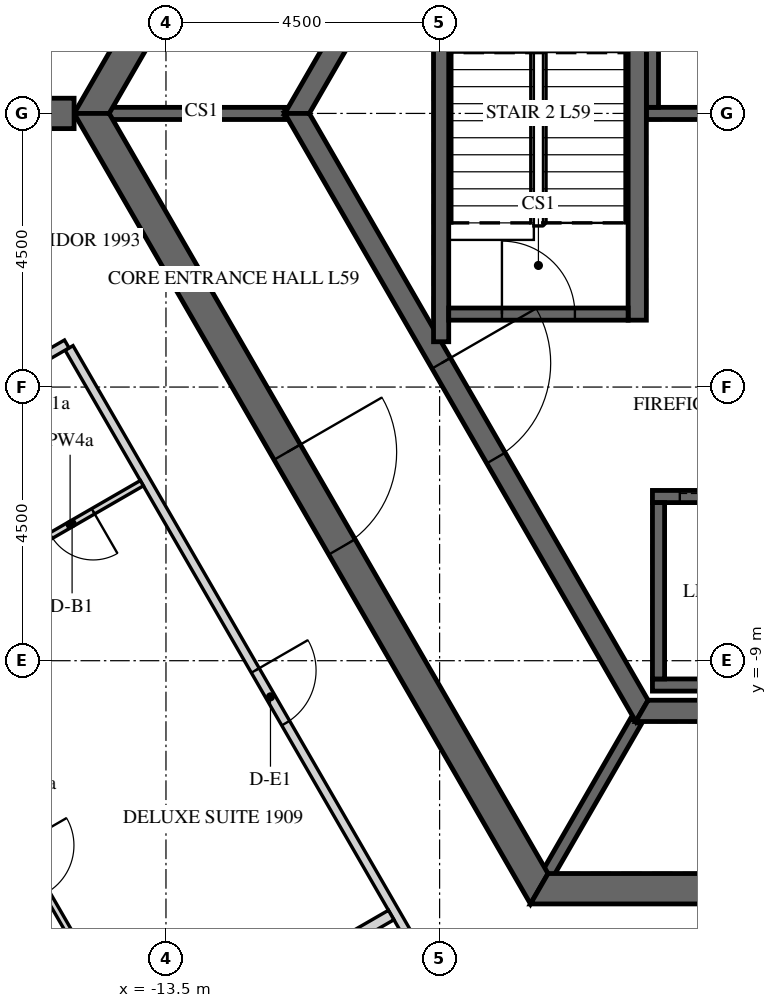
"""IFC4 building model, lengths in metres.
Left out: names, types, materials, properties, quantities, classifications, styles, units other than length and angle.
Written with IfcOpenShell. Run it as: python <this file> out.ifc"""

import sys

from ifc_helpers import new_model, si_unit, direction, frame, frame_2d, origin, place, context, subcontext, project, spatial, polyline, rectangle, outline, extrude, element, fill, save


model = new_model("IFC4")
c1 = context("Model", 3, precision=1e-05, world=origin(), true_north=direction((0.0, 1.0)))
c2 = subcontext(c1, "Body", "Model", "MODEL_VIEW")
j1 = project(units=[si_unit("LENGTHUNIT", "METRE"), si_unit("PLANEANGLEUNIT", "RADIAN")], contexts=[c1])
p1 = place(None, origin())
s1 = spatial("IfcSite", under=j1, at=p1, CompositionType="ELEMENT")
p2 = place(p1, origin())
s2 = spatial("IfcBuilding", under=s1, at=p2, CompositionType="ELEMENT")
p3 = place(p2, frame((0.0, 0.0, 246.3)))
s3 = spatial("IfcBuildingStorey", under=s2, at=p3, CompositionType="ELEMENT", Elevation=246.3)
p4 = place(p3, frame((-7.361, 12.75, -0.15), z_axis=(0.0, 0.0, 1.0), x_axis=(-0.50000571537, -0.866022103989, 0.0)))
e1 = element("IfcWall", 1, at=p4, inside=s3, PredefinedType="SHEAR", context=c2, shape_type="SweptSolid", body=[
    extrude(outline(polyline([(-0.144, -0.25), (14.867, -0.25), (14.578, 0.25), (0.144, 0.25), (-0.144, -0.25)])), origin(), (0.0, 0.0, 1.0), 3.75),
])
p5 = place(p4, frame((6.49, 0.0, 0.15)))
e2 = element("IfcOpeningElement", 2, at=p5, cuts=e1, PredefinedType="OPENING", context=c2, shape_type="SweptSolid", body=[
    extrude(rectangle(XDim=1.8, YDim=2.4, at=frame_2d((0.9, 1.2))), frame((0.0, 0.26, 0.0), z_axis=(0.0, -1.0, 0.0), x_axis=(1.0, 0.0, 0.0)), (0.0, 0.0, 1.0), 0.52),
])
p6 = place(p3, frame((-14.722, 0.0, -0.15), z_axis=(0.0, 0.0, 1.0), x_axis=(0.50000571537, -0.866022103989, 0.0)))
e3 = element("IfcWall", 3, at=p6, inside=s3, PredefinedType="SHEAR", context=c2, shape_type="SweptSolid", body=[
    extrude(outline(polyline([(-0.144, -0.25), (14.867, -0.25), (14.578, 0.25), (0.144, 0.25), (-0.144, -0.25)])), origin(), (0.0, 0.0, 1.0), 3.75),
])
p7 = place(p6, frame((6.432, 0.0, 0.15)))
e4 = element("IfcOpeningElement", 4, at=p7, cuts=e3, PredefinedType="OPENING", context=c2, shape_type="SweptSolid", body=[
    extrude(rectangle(XDim=1.8, YDim=2.4, at=frame_2d((0.9, 1.2))), frame((0.0, 0.26, 0.0), z_axis=(0.0, -1.0, 0.0), x_axis=(1.0, 0.0, 0.0)), (0.0, 0.0, 1.0), 0.52),
])
p8 = place(p3, frame((-7.361, -12.75, -0.15), z_axis=(0.0, 0.0, 1.0), x_axis=(1.0, 0.0, 0.0)))
e5 = element("IfcWall", 5, at=p8, inside=s3, PredefinedType="SHEAR", context=c2, shape_type="SweptSolid", body=[
    extrude(outline(polyline([(-0.144, -0.25), (14.866, -0.25), (14.578, 0.25), (0.144, 0.25), (-0.144, -0.25)])), origin(), (0.0, 0.0, 1.0), 3.75),
])
p9 = place(p8, frame((6.761, 0.0, 0.15)))
e6 = element("IfcOpeningElement", 6, at=p9, cuts=e5, PredefinedType="OPENING", context=c2, shape_type="SweptSolid", body=[
    extrude(rectangle(XDim=1.2, YDim=2.4, at=frame_2d((0.6, 1.2))), frame((0.0, 0.26, 0.0), z_axis=(0.0, -1.0, 0.0), x_axis=(1.0, 0.0, 0.0)), (0.0, 0.0, 1.0), 0.52),
])
p10 = place(p3, frame((-15.011, 0.0, -0.15), z_axis=(0.0, 0.0, 1.0), x_axis=(-1.0, 0.0, 0.0)))
e7 = element("IfcWall", 7, at=p10, inside=s3, PredefinedType="SHEAR", context=c2, shape_type="SweptSolid", body=[
    extrude(rectangle(XDim=15.424, YDim=0.5, at=frame_2d((7.712, 0.0))), origin(), (0.0, 0.0, 1.0), 3.75),
])
p11 = place(p10, frame((6.812, 0.0, 0.15)))
e8 = element("IfcOpeningElement", 8, at=p11, cuts=e7, PredefinedType="OPENING", context=c2, shape_type="SweptSolid", body=[
    extrude(rectangle(XDim=1.8, YDim=2.4, at=frame_2d((0.9, 1.2))), frame((0.0, 0.26, 0.0), z_axis=(0.0, -1.0, 0.0), x_axis=(1.0, 0.0, 0.0)), (0.0, 0.0, 1.0), 0.52),
])
p12 = place(p3, frame((-5.673, 9.825, -0.15), z_axis=(0.0, 0.0, 1.0), x_axis=(-0.499995046907, -0.866028263435, 0.0)))
e9 = element("IfcWall", 9, at=p12, inside=s3, PredefinedType="SHEAR", context=c2, shape_type="SweptSolid", body=[
    extrude(outline(polyline([(-0.101, -0.175), (11.446, -0.175), (11.244, 0.175), (0.101, 0.175), (-0.101, -0.175)])), origin(), (0.0, 0.0, 1.0), 3.75),
])
p13 = place(p12, frame((4.801, 0.0, 0.15)))
e10 = element("IfcOpeningElement", 10, at=p13, cuts=e9, PredefinedType="OPENING", context=c2, shape_type="SweptSolid", body=[
    extrude(rectangle(XDim=1.8, YDim=2.4, at=frame_2d((0.9, 1.2))), frame((0.0, 0.185, 0.0), z_axis=(0.0, -1.0, 0.0), x_axis=(1.0, 0.0, 0.0)), (0.0, 0.0, 1.0), 0.37),
])
p14 = place(p3, frame((-11.345, 0.0, -0.15), z_axis=(0.0, 0.0, 1.0), x_axis=(0.499995046907, -0.866028263435, 0.0)))
e11 = element("IfcWall", 11, at=p14, inside=s3, PredefinedType="SHEAR", context=c2, shape_type="SweptSolid", body=[
    extrude(outline(polyline([(-0.101, -0.175), (11.446, -0.175), (11.244, 0.175), (0.101, 0.175), (-0.101, -0.175)])), origin(), (0.0, 0.0, 1.0), 3.75),
])
p15 = place(p14, frame((4.744, 0.0, 0.15)))
e12 = element("IfcOpeningElement", 12, at=p15, cuts=e11, PredefinedType="OPENING", context=c2, shape_type="SweptSolid", body=[
    extrude(rectangle(XDim=1.8, YDim=2.4, at=frame_2d((0.9, 1.2))), frame((0.0, 0.185, 0.0), z_axis=(0.0, -1.0, 0.0), x_axis=(1.0, 0.0, 0.0)), (0.0, 0.0, 1.0), 0.37),
])
p16 = place(p3, frame((-5.673, -9.825, -0.15), z_axis=(0.0, 0.0, 1.0), x_axis=(1.0, 0.0, 0.0)))
e13 = element("IfcWall", 13, at=p16, inside=s3, PredefinedType="SHEAR", context=c2, shape_type="SweptSolid", body=[
    extrude(outline(polyline([(-0.101, -0.175), (11.446, -0.175), (11.244, 0.175), (0.101, 0.175), (-0.101, -0.175)])), origin(), (0.0, 0.0, 1.0), 3.75),
])
p17 = place(p3, frame((-5.6, 0.0, -0.25), z_axis=(0.0, 0.0, 1.0), x_axis=(1.0, 0.0, 0.0)))
e14 = element("IfcWall", 14, at=p17, inside=s3, PredefinedType="SHEAR", context=c2, shape_type="SweptSolid", body=[
    extrude(rectangle(XDim=11.2, YDim=0.2, at=frame_2d((5.6, 0.0))), origin(), (0.0, 0.0, 1.0), 3.9),
])
p18 = place(p3, frame((-5.5, 0.1, -0.25), z_axis=(0.0, 0.0, 1.0), x_axis=(0.0, 1.0, 0.0)))
e15 = element("IfcWall", 15, at=p18, inside=s3, PredefinedType="SHEAR", context=c2, shape_type="SweptSolid", body=[
    extrude(rectangle(XDim=3.1, YDim=0.2, at=frame_2d((1.55, 0.0))), origin(), (0.0, 0.0, 1.0), 3.9),
])
p19 = place(p3, frame((-5.5, -6.3, -0.25), z_axis=(0.0, 0.0, 1.0), x_axis=(1.0, 0.0, 0.0)))
e16 = element("IfcWall", 16, at=p19, inside=s3, PredefinedType="SHEAR", context=c2, shape_type="SweptSolid", body=[
    extrude(rectangle(XDim=9.2, YDim=0.2, at=frame_2d((4.6, 0.0))), origin(), (0.0, 0.0, 1.0), 3.9),
])
p20 = place(p19, frame((0.45, 0.0, 0.25)))
e17 = element("IfcOpeningElement", 17, at=p20, cuts=e16, PredefinedType="OPENING", context=c2, shape_type="SweptSolid", body=[
    extrude(rectangle(XDim=1.1, YDim=2.1, at=frame_2d((0.55, 1.05))), frame((0.0, 0.11, 0.0), z_axis=(0.0, -1.0, 0.0), x_axis=(1.0, 0.0, 0.0)), (0.0, 0.0, 1.0), 0.22),
])
p21 = place(p19, frame((2.25, 0.0, 0.25)))
e18 = element("IfcOpeningElement", 18, at=p21, cuts=e16, PredefinedType="OPENING", context=c2, shape_type="SweptSolid", body=[
    extrude(rectangle(XDim=1.1, YDim=2.1, at=frame_2d((0.55, 1.05))), frame((0.0, 0.11, 0.0), z_axis=(0.0, -1.0, 0.0), x_axis=(1.0, 0.0, 0.0)), (0.0, 0.0, 1.0), 0.22),
])
p22 = place(p19, frame((4.05, 0.0, 0.25)))
e19 = element("IfcOpeningElement", 19, at=p22, cuts=e16, PredefinedType="OPENING", context=c2, shape_type="SweptSolid", body=[
    extrude(rectangle(XDim=1.1, YDim=2.1, at=frame_2d((0.55, 1.05))), frame((0.0, 0.11, 0.0), z_axis=(0.0, -1.0, 0.0), x_axis=(1.0, 0.0, 0.0)), (0.0, 0.0, 1.0), 0.22),
])
p23 = place(p19, frame((5.85, 0.0, 0.25)))
e20 = element("IfcOpeningElement", 20, at=p23, cuts=e16, PredefinedType="OPENING", context=c2, shape_type="SweptSolid", body=[
    extrude(rectangle(XDim=1.1, YDim=2.1, at=frame_2d((0.55, 1.05))), frame((0.0, 0.11, 0.0), z_axis=(0.0, -1.0, 0.0), x_axis=(1.0, 0.0, 0.0)), (0.0, 0.0, 1.0), 0.22),
])
p24 = place(p19, frame((7.65, 0.0, 0.25)))
e21 = element("IfcOpeningElement", 21, at=p24, cuts=e16, PredefinedType="OPENING", context=c2, shape_type="SweptSolid", body=[
    extrude(rectangle(XDim=1.1, YDim=2.1, at=frame_2d((0.55, 1.05))), frame((0.0, 0.11, 0.0), z_axis=(0.0, -1.0, 0.0), x_axis=(1.0, 0.0, 0.0)), (0.0, 0.0, 1.0), 0.22),
])
p25 = place(p3, frame((-5.5, -9.4, -0.25), z_axis=(0.0, 0.0, 1.0), x_axis=(1.0, 0.0, 0.0)))
e22 = element("IfcWall", 22, at=p25, inside=s3, PredefinedType="SHEAR", context=c2, shape_type="SweptSolid", body=[
    extrude(rectangle(XDim=9.2, YDim=0.2, at=frame_2d((4.6, 0.0))), origin(), (0.0, 0.0, 1.0), 3.9),
])
p26 = place(p3, frame((-5.4, -9.3, -0.25), z_axis=(0.0, 0.0, 1.0), x_axis=(0.0, 1.0, 0.0)))
e23 = element("IfcWall", 23, at=p26, inside=s3, PredefinedType="SHEAR", context=c2, shape_type="SweptSolid", body=[
    extrude(rectangle(XDim=2.9, YDim=0.2, at=frame_2d((1.45, 0.0))), origin(), (0.0, 0.0, 1.0), 3.9),
])
for number, where, z_axis, x_axis in (
    (24, (-11.547, 0.0, -0.15), (0.0, 0.0, 1.0), (-1.0, 0.0, 0.0)),
    (25, (-5.773, -10.0, -0.15), (0.0, 0.0, 1.0), (-0.5, -0.866, 0.0)),
):
    element("IfcWall", number, at=place(p3, frame(where, z_axis=z_axis, x_axis=x_axis)), inside=s3, PredefinedType="SHEAR", context=c2, shape_type="SweptSolid", body=[
        extrude(rectangle(XDim=2.887, YDim=0.2, at=frame_2d((1.443, 0.0))), origin(), (0.0, 0.0, 1.0), 3.75),
    ])
p27 = place(p3, frame((-5.75, -3.4, -0.25), z_axis=(0.0, 0.0, 1.0), x_axis=(0.0, 1.0, 0.0)))
e26 = element("IfcWall", 26, at=p27, inside=s3, PredefinedType="SHEAR", context=c2, shape_type="SweptSolid", body=[
    extrude(rectangle(XDim=6.8, YDim=0.3, at=frame_2d((3.4, 0.0))), origin(), (0.0, 0.0, 1.0), 3.9),
])
p28 = place(p3, frame((-8.975, -3.755, -0.25), z_axis=(0.0, 0.0, 1.0), x_axis=(0.0, 1.0, 0.0)))
e27 = element("IfcWall", 27, at=p28, inside=s3, PredefinedType="SHEAR", context=c2, shape_type="SweptSolid", body=[
    extrude(rectangle(XDim=7.51, YDim=0.25, at=frame_2d((3.755, 0.0))), origin(), (0.0, 0.0, 1.0), 3.9),
])
p29 = place(p3, frame((-8.85, -3.3, -0.25), z_axis=(0.0, 0.0, 1.0), x_axis=(1.0, 0.0, 0.0)))
e28 = element("IfcWall", 28, at=p29, inside=s3, PredefinedType="SHEAR", context=c2, shape_type="SweptSolid", body=[
    extrude(rectangle(XDim=2.95, YDim=0.2, at=frame_2d((1.475, 0.0))), origin(), (0.0, 0.0, 1.0), 3.9),
])
p30 = place(p29, frame((0.875, 0.0, 0.25)))
e29 = element("IfcOpeningElement", 29, at=p30, cuts=e28, PredefinedType="OPENING", context=c2, shape_type="SweptSolid", body=[
    extrude(rectangle(XDim=1.2, YDim=2.4, at=frame_2d((0.6, 1.2))), frame((0.0, 0.11, 0.0), z_axis=(0.0, -1.0, 0.0), x_axis=(1.0, 0.0, 0.0)), (0.0, 0.0, 1.0), 0.22),
])
p31 = place(p3, frame((-15.094, -3.856, 0.0), z_axis=(0.0, 0.0, 1.0), x_axis=(0.500006037985, -0.866021917724, 0.0)))
e30 = element("IfcWall", 30, at=p31, inside=s3, PredefinedType="PARTITIONING", context=c2, shape_type="SweptSolid", body=[
    extrude(rectangle(XDim=12.867, YDim=0.15, at=frame_2d((6.434, 0.0))), origin(), (0.0, 0.0, 1.0), 2.838),
])
p32 = place(p31, frame((6.125, 0.0, 0.0)))
e31 = element("IfcOpeningElement", 31, at=p32, cuts=e30, PredefinedType="OPENING", context=c2, shape_type="SweptSolid", body=[
    extrude(rectangle(XDim=1.0, YDim=2.1, at=frame_2d((0.5, 1.05))), frame((0.0, 0.085, 0.0), z_axis=(0.0, -1.0, 0.0), x_axis=(1.0, 0.0, 0.0)), (0.0, 0.0, 1.0), 0.17),
])
p33 = place(p3, frame((-16.49, -4.576, 0.0), z_axis=(0.0, 0.0, 1.0), x_axis=(0.865993845424, 0.5000546567, 0.0)))
e32 = element("IfcWall", 32, at=p33, inside=s3, PredefinedType="PARTITIONING", context=c2, shape_type="SweptSolid", body=[
    extrude(rectangle(XDim=1.569, YDim=0.15, at=frame_2d((0.785, 0.0))), origin(), (0.0, 0.0, 1.0), 2.838),
])
p34 = place(p3, frame((-13.896, -6.081, 0.0), z_axis=(0.0, 0.0, 1.0), x_axis=(-0.866012511928, -0.500022328685, 0.0)))
e33 = element("IfcWall", 33, at=p34, inside=s3, PredefinedType="PARTITIONING", context=c2, shape_type="SweptSolid", body=[
    extrude(rectangle(XDim=2.725, YDim=0.1, at=frame_2d((1.363, 0.0))), origin(), (0.0, 0.0, 1.0), 2.838),
])
p35 = place(p34, frame((0.925, 0.0, 0.0)))
e34 = element("IfcOpeningElement", 34, at=p35, cuts=e33, PredefinedType="OPENING", context=c2, shape_type="SweptSolid", body=[
    extrude(rectangle(XDim=0.8, YDim=2.1, at=frame_2d((0.4, 1.05))), frame((0.0, 0.06, 0.0), z_axis=(0.0, -1.0, 0.0), x_axis=(1.0, 0.0, 0.0)), (0.0, 0.0, 1.0), 0.12),
])
p36 = place(p3, frame((-17.463, -9.353, 0.0), z_axis=(0.0, 0.0, 1.0), x_axis=(0.499995846692, -0.866027801685, 0.0)))
e35 = element("IfcWall", 35, at=p36, inside=s3, PredefinedType="PARTITIONING", context=c2, shape_type="SweptSolid", body=[
    extrude(rectangle(XDim=7.06, YDim=0.1, at=frame_2d((3.53, 0.0))), origin(), (0.0, 0.0, 1.0), 2.838),
])
p37 = place(p36, frame((3.1, 0.0, 0.0)))
e36 = element("IfcOpeningElement", 36, at=p37, cuts=e35, PredefinedType="OPENING", context=c2, shape_type="SweptSolid", body=[
    extrude(rectangle(XDim=0.9, YDim=2.1, at=frame_2d((0.45, 1.05))), frame((0.0, 0.06, 0.0), z_axis=(0.0, -1.0, 0.0), x_axis=(1.0, 0.0, 0.0)), (0.0, 0.0, 1.0), 0.12),
])
p38 = place(p3, frame((-20.513, -19.37, 0.0), z_axis=(0.0, 0.0, 1.0), x_axis=(0.866024931941, 0.500000817256, 0.0)))
e37 = element("IfcWall", 37, at=p38, inside=s3, PredefinedType="PARTITIONING", context=c2, shape_type="SweptSolid", body=[
    extrude(rectangle(XDim=12.375, YDim=0.18, at=frame_2d((6.188, 0.0))), origin(), (0.0, 0.0, 1.0), 2.838),
])
p39 = place(p7, origin())
e38 = element("IfcDoor", 38, at=p39, inside=s3, OperationType="DOUBLE_DOOR_SINGLE_SWING", PredefinedType="DOOR", context=c2, shape_type="SweptSolid", body=[
    extrude(rectangle(XDim=1.8, YDim=2.4, at=frame_2d((0.9, 1.2))), frame((0.0, 0.025, 0.0), z_axis=(0.0, -1.0, 0.0), x_axis=(1.0, 0.0, 0.0)), (0.0, 0.0, 1.0), 0.05),
])
fill(e4, e38)
p40 = place(p15, origin())
e39 = element("IfcDoor", 39, at=p40, inside=s3, OperationType="DOUBLE_DOOR_SINGLE_SWING", PredefinedType="DOOR", context=c2, shape_type="SweptSolid", body=[
    extrude(rectangle(XDim=1.8, YDim=2.4, at=frame_2d((0.9, 1.2))), frame((0.0, 0.025, 0.0), z_axis=(0.0, -1.0, 0.0), x_axis=(1.0, 0.0, 0.0)), (0.0, 0.0, 1.0), 0.05),
])
fill(e12, e39)
p41 = place(p30, origin())
e40 = element("IfcDoor", 40, at=p41, inside=s3, OperationType="SINGLE_SWING_LEFT", PredefinedType="DOOR", context=c2, shape_type="SweptSolid", body=[
    extrude(rectangle(XDim=1.2, YDim=2.4, at=frame_2d((0.6, 1.2))), frame((0.0, 0.025, 0.0), z_axis=(0.0, -1.0, 0.0), x_axis=(1.0, 0.0, 0.0)), (0.0, 0.0, 1.0), 0.05),
])
fill(e29, e40)
p42 = place(p20, origin())
e41 = element("IfcDoor", 41, at=p42, inside=s3, OperationType="SLIDING_TO_LEFT", PredefinedType="DOOR", context=c2, shape_type="SweptSolid", body=[
    extrude(rectangle(XDim=1.1, YDim=2.1, at=frame_2d((0.55, 1.05))), frame((0.0, 0.025, 0.0), z_axis=(0.0, -1.0, 0.0), x_axis=(1.0, 0.0, 0.0)), (0.0, 0.0, 1.0), 0.05),
])
fill(e17, e41)
p43 = place(p32, origin())
e42 = element("IfcDoor", 42, at=p43, inside=s3, OperationType="SINGLE_SWING_LEFT", PredefinedType="DOOR", context=c2, shape_type="SweptSolid", body=[
    extrude(rectangle(XDim=1.0, YDim=2.1, at=frame_2d((0.5, 1.05))), frame((0.0, 0.025, 0.0), z_axis=(0.0, -1.0, 0.0), x_axis=(1.0, 0.0, 0.0)), (0.0, 0.0, 1.0), 0.05),
])
fill(e31, e42)
p44 = place(p35, origin())
e43 = element("IfcDoor", 43, at=p44, inside=s3, OperationType="SINGLE_SWING_RIGHT", PredefinedType="DOOR", context=c2, shape_type="SweptSolid", body=[
    extrude(rectangle(XDim=0.8, YDim=2.1, at=frame_2d((0.4, 1.05))), frame((0.0, 0.025, 0.0), z_axis=(0.0, -1.0, 0.0), x_axis=(1.0, 0.0, 0.0)), (0.0, 0.0, 1.0), 0.05),
])
fill(e34, e43)
save(model, sys.argv[1])
